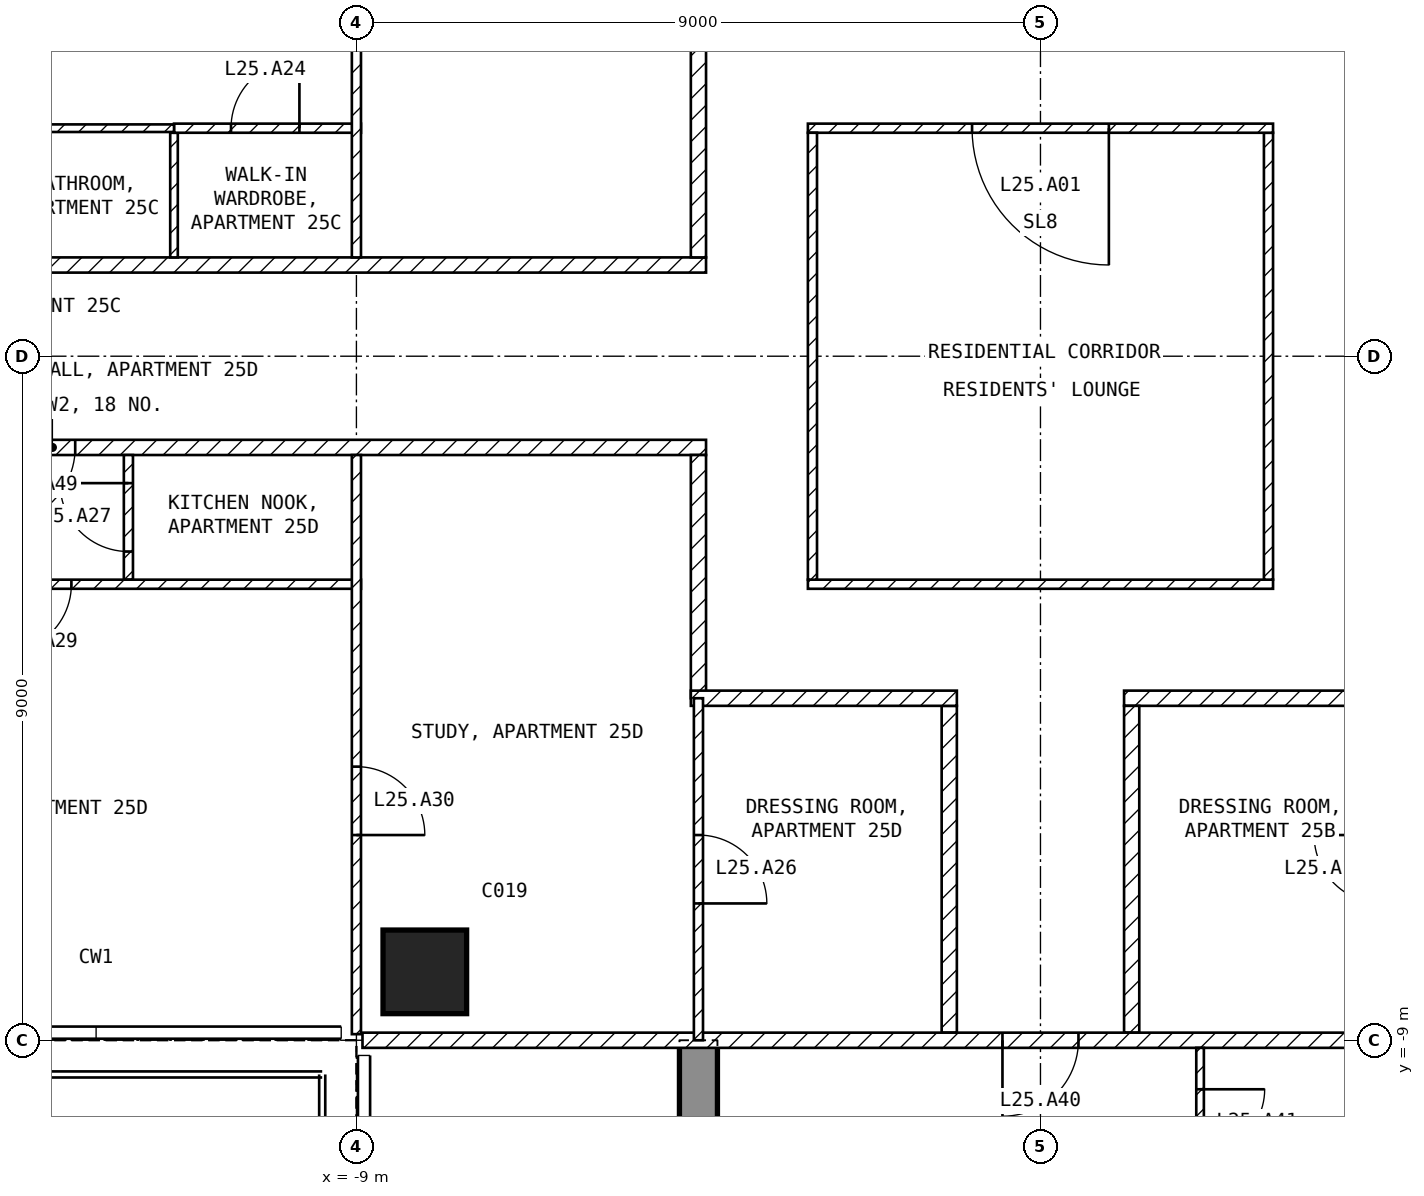
"""IFC4 building model, lengths in metres.
Left out: names, types, materials, properties, quantities, classifications, styles, units other than length and angle.
Written with IfcOpenShell. Run it as: python <this file> out.ifc"""

import sys

from ifc_helpers import new_model, si_unit, direction, frame, frame_2d, origin, origin_2d, place, context, subcontext, project, spatial, polyline, rectangle, outline, extrude, element, fill, save


model = new_model("IFC4")
c1 = context("Model", 3, precision=1e-05, world=origin(), true_north=direction((0.0, 1.0)))
c2 = subcontext(c1, "Body", "Model", "MODEL_VIEW")
j1 = project(units=[si_unit("LENGTHUNIT", "METRE"), si_unit("PLANEANGLEUNIT", "RADIAN")], contexts=[c1])
p1 = place(None, origin())
s1 = spatial("IfcSite", under=j1, at=p1, CompositionType="ELEMENT")
p2 = place(p1, origin())
s2 = spatial("IfcBuilding", under=s1, at=p2, CompositionType="ELEMENT")
p3 = place(p2, frame((0.0, 0.0, 109.4)))
s3 = spatial("IfcBuildingStorey", under=s2, at=p3, CompositionType="ELEMENT", Elevation=109.4)
p4 = place(p3, frame((-8.1, -8.1, -0.25), z_axis=(0.0, 0.0, 1.0), x_axis=(1.0, 0.0, 0.0)))
e1 = element("IfcColumn", 1, at=p4, inside=s3, PredefinedType="COLUMN", context=c2, shape_type="SweptSolid", body=[
    extrude(rectangle(XDim=1.1, YDim=1.1, at=origin_2d()), origin(), (0.0, 0.0, 1.0), 3.5),
])
p5 = place(p3, frame((-4.75, -20.15, -0.25), z_axis=(1.0, 0.0, 0.0), x_axis=(0.0, 1.0, 0.0)))
e2 = element("IfcWall", 2, at=p5, inside=s3, PredefinedType="SHEAR", context=c2, shape_type="SweptSolid", body=[
    extrude(outline(polyline([(0.0, 0.0), (6.65, 0.0), (6.65, 2.65), (9.05, 2.65), (9.05, 0.0), (11.15, 0.0), (11.15, 3.5), (0.0, 3.5), (0.0, 0.0)])), origin(), (0.0, 0.0, 1.0), 0.5),
])
p6 = place(p3, frame((-3.06, -3.0, 0.0), z_axis=(0.0, 0.0, 1.0), x_axis=(1.0, 0.0, 0.0)))
e3 = element("IfcWall", 3, at=p6, inside=s3, PredefinedType="PARTITIONING", context=c2, shape_type="SweptSolid", body=[
    extrude(rectangle(XDim=6.12, YDim=0.12, at=frame_2d((3.06, 0.0))), origin(), (0.0, 0.0, 1.0), 3.25),
])
p7 = place(p3, frame((3.0, -2.94, 0.0), z_axis=(0.0, 0.0, 1.0), x_axis=(0.0, 1.0, 0.0)))
e4 = element("IfcWall", 4, at=p7, inside=s3, PredefinedType="PARTITIONING", context=c2, shape_type="SweptSolid", body=[
    extrude(rectangle(XDim=5.88, YDim=0.12, at=frame_2d((2.94, 0.0))), origin(), (0.0, 0.0, 1.0), 3.25),
])
p8 = place(p3, frame((3.06, 3.0, 0.0), z_axis=(0.0, 0.0, 1.0), x_axis=(-1.0, 0.0, 0.0)))
e5 = element("IfcWall", 5, at=p8, inside=s3, PredefinedType="PARTITIONING", context=c2, shape_type="SweptSolid", body=[
    extrude(rectangle(XDim=6.12, YDim=0.12, at=frame_2d((3.06, 0.0))), origin(), (0.0, 0.0, 1.0), 3.25),
])
p9 = place(p8, frame((2.16, 0.0, 0.0)))
e6 = element("IfcOpeningElement", 6, at=p9, cuts=e5, PredefinedType="OPENING", context=c2, shape_type="SweptSolid", body=[
    extrude(rectangle(XDim=1.8, YDim=2.1, at=frame_2d((0.9, 1.05))), frame((0.0, 0.07, 0.0), z_axis=(0.0, -1.0, 0.0), x_axis=(1.0, 0.0, 0.0)), (0.0, 0.0, 1.0), 0.14),
])
p10 = place(p3, frame((-3.0, 2.94, 0.0), z_axis=(0.0, 0.0, 1.0), x_axis=(0.0, -1.0, 0.0)))
e7 = element("IfcWall", 7, at=p10, inside=s3, PredefinedType="PARTITIONING", context=c2, shape_type="SweptSolid", body=[
    extrude(rectangle(XDim=5.88, YDim=0.12, at=frame_2d((2.94, 0.0))), origin(), (0.0, 0.0, 1.0), 3.25),
])
p11 = place(p3, frame((4.6, -4.5, 0.0), z_axis=(0.0, 0.0, 1.0), x_axis=(-1.0, 0.0, 0.0)))
e8 = element("IfcWall", 8, at=p11, inside=s3, PredefinedType="PARTITIONING", context=c2, shape_type="SweptSolid", body=[
    extrude(rectangle(XDim=3.5, YDim=0.2, at=frame_2d((1.75, 0.0))), origin(), (0.0, 0.0, 1.0), 3.25),
])
p12 = place(p3, frame((1.2, -4.6, 0.0), z_axis=(0.0, 0.0, 1.0), x_axis=(0.0, -1.0, 0.0)))
e9 = element("IfcWall", 9, at=p12, inside=s3, PredefinedType="PARTITIONING", context=c2, shape_type="SweptSolid", body=[
    extrude(rectangle(XDim=4.3, YDim=0.2, at=frame_2d((2.15, 0.0))), origin(), (0.0, 0.0, 1.0), 3.25),
])
p13 = place(p3, frame((-21.6, 1.2, 0.0), z_axis=(0.0, 0.0, 1.0), x_axis=(1.0, 0.0, 0.0)))
e10 = element("IfcWall", 10, at=p13, inside=s3, PredefinedType="PARTITIONING", context=c2, shape_type="SweptSolid", body=[
    extrude(rectangle(XDim=17.2, YDim=0.2, at=frame_2d((8.6, 0.0))), origin(), (0.0, 0.0, 1.0), 3.25),
])
p14 = place(p13, frame((6.1, 0.0, 0.0)))
e11 = element("IfcOpeningElement", 11, at=p14, cuts=e10, PredefinedType="OPENING", context=c2, shape_type="SweptSolid", body=[
    extrude(rectangle(XDim=1.0, YDim=2.1, at=frame_2d((0.5, 1.05))), frame((0.0, 0.11, 0.0), z_axis=(0.0, -1.0, 0.0), x_axis=(1.0, 0.0, 0.0)), (0.0, 0.0, 1.0), 0.22),
])
p15 = place(p3, frame((-4.5, 1.3, 0.0), z_axis=(0.0, 0.0, 1.0), x_axis=(0.0, 1.0, 0.0)))
e12 = element("IfcWall", 12, at=p15, inside=s3, PredefinedType="PARTITIONING", context=c2, shape_type="SweptSolid", body=[
    extrude(rectangle(XDim=3.2, YDim=0.2, at=frame_2d((1.6, 0.0))), origin(), (0.0, 0.0, 1.0), 3.25),
])
p16 = place(p3, frame((-4.4, -1.2, 0.0), z_axis=(0.0, 0.0, 1.0), x_axis=(-1.0, 0.0, 0.0)))
e13 = element("IfcWall", 13, at=p16, inside=s3, PredefinedType="PARTITIONING", context=c2, shape_type="SweptSolid", body=[
    extrude(rectangle(XDim=17.2, YDim=0.2, at=frame_2d((8.6, 0.0))), origin(), (0.0, 0.0, 1.0), 3.25),
])
p17 = place(p16, frame((8.3, 0.0, 0.0)))
e14 = element("IfcOpeningElement", 14, at=p17, cuts=e13, PredefinedType="OPENING", context=c2, shape_type="SweptSolid", body=[
    extrude(rectangle(XDim=1.0, YDim=2.1, at=frame_2d((0.5, 1.05))), frame((0.0, 0.11, 0.0), z_axis=(0.0, -1.0, 0.0), x_axis=(1.0, 0.0, 0.0)), (0.0, 0.0, 1.0), 0.22),
])
p18 = place(p3, frame((-4.5, -4.5, 0.0), z_axis=(0.0, 0.0, 1.0), x_axis=(0.0, 1.0, 0.0)))
e15 = element("IfcWall", 15, at=p18, inside=s3, PredefinedType="PARTITIONING", context=c2, shape_type="SweptSolid", body=[
    extrude(rectangle(XDim=3.2, YDim=0.2, at=frame_2d((1.6, 0.0))), origin(), (0.0, 0.0, 1.0), 3.25),
])
p19 = place(p3, frame((-1.2, -8.9, 0.0), z_axis=(0.0, 0.0, 1.0), x_axis=(0.0, 1.0, 0.0)))
e16 = element("IfcWall", 16, at=p19, inside=s3, PredefinedType="PARTITIONING", context=c2, shape_type="SweptSolid", body=[
    extrude(rectangle(XDim=4.3, YDim=0.2, at=frame_2d((2.15, 0.0))), origin(), (0.0, 0.0, 1.0), 3.25),
])
p20 = place(p3, frame((-1.1, -4.5, 0.0), z_axis=(0.0, 0.0, 1.0), x_axis=(-1.0, 0.0, 0.0)))
e17 = element("IfcWall", 17, at=p20, inside=s3, PredefinedType="PARTITIONING", context=c2, shape_type="SweptSolid", body=[
    extrude(rectangle(XDim=3.5, YDim=0.2, at=frame_2d((1.75, 0.0))), origin(), (0.0, 0.0, 1.0), 3.25),
])
p21 = place(p3, frame((8.92, -9.0, 0.0), z_axis=(0.0, 0.0, 1.0), x_axis=(-1.0, 0.0, 0.0)))
e18 = element("IfcWall", 18, at=p21, inside=s3, PredefinedType="PARTITIONING", context=c2, shape_type="SweptSolid", body=[
    extrude(rectangle(XDim=17.84, YDim=0.2, at=frame_2d((8.92, 0.0))), origin(), (0.0, 0.0, 1.0), 3.25),
])
p22 = place(p21, frame((8.42, 0.0, 0.0)))
e19 = element("IfcOpeningElement", 19, at=p22, cuts=e18, PredefinedType="OPENING", context=c2, shape_type="SweptSolid", body=[
    extrude(rectangle(XDim=1.0, YDim=2.1, at=frame_2d((0.5, 1.05))), frame((0.0, 0.11, 0.0), z_axis=(0.0, -1.0, 0.0), x_axis=(1.0, 0.0, 0.0)), (0.0, 0.0, 1.0), 0.22),
])
p23 = place(p3, frame((-11.4, 1.3, 0.0), z_axis=(0.0, 0.0, 1.0), x_axis=(0.0, 1.0, 0.0)))
e20 = element("IfcWall", 20, at=p23, inside=s3, PredefinedType="PARTITIONING", context=c2, shape_type="SweptSolid", body=[
    extrude(rectangle(XDim=1.64, YDim=0.1, at=frame_2d((0.82, 0.0))), origin(), (0.0, 0.0, 1.0), 3.25),
])
p24 = place(p3, frame((-11.4, 3.0, 0.0), z_axis=(0.0, 0.0, 1.0), x_axis=(1.0, 0.0, 0.0)))
e21 = element("IfcWall", 21, at=p24, inside=s3, PredefinedType="PARTITIONING", context=c2, shape_type="SweptSolid", body=[
    extrude(rectangle(XDim=2.46, YDim=0.12, at=frame_2d((1.23, 0.0))), origin(), (0.0, 0.0, 1.0), 3.25),
])
p25 = place(p24, frame((0.75, 0.0, 0.0)))
e22 = element("IfcOpeningElement", 22, at=p25, cuts=e21, PredefinedType="OPENING", context=c2, shape_type="SweptSolid", body=[
    extrude(rectangle(XDim=0.9, YDim=2.1, at=frame_2d((0.45, 1.05))), frame((0.0, 0.07, 0.0), z_axis=(0.0, -1.0, 0.0), x_axis=(1.0, 0.0, 0.0)), (0.0, 0.0, 1.0), 0.14),
])
p26 = place(p3, frame((-9.0, 8.92, 0.0), z_axis=(0.0, 0.0, 1.0), x_axis=(0.0, -1.0, 0.0)))
e23 = element("IfcWall", 23, at=p26, inside=s3, PredefinedType="PARTITIONING", context=c2, shape_type="SweptSolid", body=[
    extrude(rectangle(XDim=7.62, YDim=0.12, at=frame_2d((3.81, 0.0))), origin(), (0.0, 0.0, 1.0), 3.25),
])
p27 = place(p26, frame((2.62, 0.0, 0.0)))
e24 = element("IfcOpeningElement", 24, at=p27, cuts=e23, PredefinedType="OPENING", context=c2, shape_type="SweptSolid", body=[
    extrude(rectangle(XDim=0.9, YDim=2.1, at=frame_2d((0.45, 1.05))), frame((0.0, 0.07, 0.0), z_axis=(0.0, -1.0, 0.0), x_axis=(1.0, 0.0, 0.0)), (0.0, 0.0, 1.0), 0.14),
])
p28 = place(p3, frame((-13.8, 3.0, 0.0), z_axis=(0.0, 0.0, 1.0), x_axis=(1.0, 0.0, 0.0)))
e25 = element("IfcWall", 25, at=p28, inside=s3, PredefinedType="PARTITIONING", context=c2, shape_type="SweptSolid", body=[
    extrude(rectangle(XDim=2.4, YDim=0.1, at=frame_2d((1.2, 0.0))), origin(), (0.0, 0.0, 1.0), 3.25),
])
p29 = place(p3, frame((-12.0, -2.94, 0.0), z_axis=(0.0, 0.0, 1.0), x_axis=(0.0, 1.0, 0.0)))
e26 = element("IfcWall", 26, at=p29, inside=s3, PredefinedType="PARTITIONING", context=c2, shape_type="SweptSolid", body=[
    extrude(rectangle(XDim=1.64, YDim=0.12, at=frame_2d((0.82, 0.0))), origin(), (0.0, 0.0, 1.0), 3.25),
])
p30 = place(p29, frame((0.37, 0.0, 0.0)))
e27 = element("IfcOpeningElement", 27, at=p30, cuts=e26, PredefinedType="OPENING", context=c2, shape_type="SweptSolid", body=[
    extrude(rectangle(XDim=0.9, YDim=2.1, at=frame_2d((0.45, 1.05))), frame((0.0, 0.07, 0.0), z_axis=(0.0, -1.0, 0.0), x_axis=(1.0, 0.0, 0.0)), (0.0, 0.0, 1.0), 0.14),
])
p31 = place(p3, frame((-8.94, -3.0, 0.0), z_axis=(0.0, 0.0, 1.0), x_axis=(-1.0, 0.0, 0.0)))
e28 = element("IfcWall", 28, at=p31, inside=s3, PredefinedType="PARTITIONING", context=c2, shape_type="SweptSolid", body=[
    extrude(rectangle(XDim=7.86, YDim=0.12, at=frame_2d((3.93, 0.0))), origin(), (0.0, 0.0, 1.0), 3.25),
])
p32 = place(p31, frame((3.81, 0.0, 0.0)))
e29 = element("IfcOpeningElement", 29, at=p32, cuts=e28, PredefinedType="OPENING", context=c2, shape_type="SweptSolid", body=[
    extrude(rectangle(XDim=0.9, YDim=2.1, at=frame_2d((0.45, 1.05))), frame((0.0, 0.07, 0.0), z_axis=(0.0, -1.0, 0.0), x_axis=(1.0, 0.0, 0.0)), (0.0, 0.0, 1.0), 0.14),
])
p33 = place(p3, frame((-9.0, -1.3, 0.0), z_axis=(0.0, 0.0, 1.0), x_axis=(0.0, -1.0, 0.0)))
e30 = element("IfcWall", 30, at=p33, inside=s3, PredefinedType="PARTITIONING", context=c2, shape_type="SweptSolid", body=[
    extrude(rectangle(XDim=7.62, YDim=0.12, at=frame_2d((3.81, 0.0))), origin(), (0.0, 0.0, 1.0), 3.25),
])
p34 = place(p33, frame((4.1, 0.0, 0.0)))
e31 = element("IfcOpeningElement", 31, at=p34, cuts=e30, PredefinedType="OPENING", context=c2, shape_type="SweptSolid", body=[
    extrude(rectangle(XDim=0.9, YDim=2.1, at=frame_2d((0.45, 1.05))), frame((0.0, 0.07, 0.0), z_axis=(0.0, -1.0, 0.0), x_axis=(1.0, 0.0, 0.0)), (0.0, 0.0, 1.0), 0.14),
])
p35 = place(p3, frame((-4.5, -4.5, 0.0), z_axis=(0.0, 0.0, 1.0), x_axis=(0.0, -1.0, 0.0)))
e32 = element("IfcWall", 32, at=p35, inside=s3, PredefinedType="PARTITIONING", context=c2, shape_type="SweptSolid", body=[
    extrude(rectangle(XDim=4.5, YDim=0.12, at=frame_2d((2.25, 0.0))), origin(), (0.0, 0.0, 1.0), 3.25),
])
p36 = place(p35, frame((1.8, 0.0, 0.0)))
e33 = element("IfcOpeningElement", 33, at=p36, cuts=e32, PredefinedType="OPENING", context=c2, shape_type="SweptSolid", body=[
    extrude(rectangle(XDim=0.9, YDim=2.1, at=frame_2d((0.45, 1.05))), frame((0.0, 0.07, 0.0), z_axis=(0.0, -1.0, 0.0), x_axis=(1.0, 0.0, 0.0)), (0.0, 0.0, 1.0), 0.14),
])
p37 = place(p3, frame((2.1, -9.1, 0.0), z_axis=(0.0, 0.0, 1.0), x_axis=(0.0, -1.0, 0.0)))
e34 = element("IfcWall", 34, at=p37, inside=s3, PredefinedType="PARTITIONING", context=c2, shape_type="SweptSolid", body=[
    extrude(rectangle(XDim=1.94, YDim=0.1, at=frame_2d((0.97, 0.0))), origin(), (0.0, 0.0, 1.0), 3.25),
])
p38 = place(p37, frame((0.545, 0.0, 0.0)))
e35 = element("IfcOpeningElement", 35, at=p38, cuts=e34, PredefinedType="OPENING", context=c2, shape_type="SweptSolid", body=[
    extrude(rectangle(XDim=0.85, YDim=2.1, at=frame_2d((0.425, 1.05))), frame((0.0, 0.06, 0.0), z_axis=(0.0, -1.0, 0.0), x_axis=(1.0, 0.0, 0.0)), (0.0, 0.0, 1.0), 0.12),
])
p39 = place(p9, origin())
e36 = element("IfcDoor", 36, at=p39, inside=s3, OperationType="SINGLE_SWING_LEFT", PredefinedType="DOOR", context=c2, shape_type="SweptSolid", body=[
    extrude(rectangle(XDim=1.8, YDim=2.1, at=frame_2d((0.9, 1.05))), frame((0.0, 0.025, 0.0), z_axis=(0.0, -1.0, 0.0), x_axis=(1.0, 0.0, 0.0)), (0.0, 0.0, 1.0), 0.05),
])
fill(e6, e36)
p40 = place(p25, origin())
e37 = element("IfcDoor", 37, at=p40, inside=s3, OperationType="SINGLE_SWING_RIGHT", PredefinedType="DOOR", context=c2, shape_type="SweptSolid", body=[
    extrude(rectangle(XDim=0.9, YDim=2.1, at=frame_2d((0.45, 1.05))), frame((0.0, 0.025, 0.0), z_axis=(0.0, -1.0, 0.0), x_axis=(1.0, 0.0, 0.0)), (0.0, 0.0, 1.0), 0.05),
])
fill(e22, e37)
p41 = place(p36, origin())
e38 = element("IfcDoor", 38, at=p41, inside=s3, OperationType="SINGLE_SWING_RIGHT", PredefinedType="DOOR", context=c2, shape_type="SweptSolid", body=[
    extrude(rectangle(XDim=0.9, YDim=2.1, at=frame_2d((0.45, 1.05))), frame((0.0, 0.025, 0.0), z_axis=(0.0, -1.0, 0.0), x_axis=(1.0, 0.0, 0.0)), (0.0, 0.0, 1.0), 0.05),
])
fill(e33, e38)
p42 = place(p30, origin())
e39 = element("IfcDoor", 39, at=p42, inside=s3, OperationType="SINGLE_SWING_RIGHT", PredefinedType="DOOR", context=c2, shape_type="SweptSolid", body=[
    extrude(rectangle(XDim=0.9, YDim=2.1, at=frame_2d((0.45, 1.05))), frame((0.0, 0.025, 0.0), z_axis=(0.0, -1.0, 0.0), x_axis=(1.0, 0.0, 0.0)), (0.0, 0.0, 1.0), 0.05),
])
fill(e27, e39)
p43 = place(p32, origin())
e40 = element("IfcDoor", 40, at=p43, inside=s3, OperationType="SINGLE_SWING_RIGHT", PredefinedType="DOOR", context=c2, shape_type="SweptSolid", body=[
    extrude(rectangle(XDim=0.9, YDim=2.1, at=frame_2d((0.45, 1.05))), frame((0.0, 0.025, 0.0), z_axis=(0.0, -1.0, 0.0), x_axis=(1.0, 0.0, 0.0)), (0.0, 0.0, 1.0), 0.05),
])
fill(e29, e40)
p44 = place(p34, origin())
e41 = element("IfcDoor", 41, at=p44, inside=s3, OperationType="SINGLE_SWING_RIGHT", PredefinedType="DOOR", context=c2, shape_type="SweptSolid", body=[
    extrude(rectangle(XDim=0.9, YDim=2.1, at=frame_2d((0.45, 1.05))), frame((0.0, 0.025, 0.0), z_axis=(0.0, -1.0, 0.0), x_axis=(1.0, 0.0, 0.0)), (0.0, 0.0, 1.0), 0.05),
])
fill(e31, e41)
p45 = place(p22, origin())
e42 = element("IfcDoor", 42, at=p45, inside=s3, OperationType="SINGLE_SWING_RIGHT", PredefinedType="DOOR", context=c2, shape_type="SweptSolid", body=[
    extrude(rectangle(XDim=1.0, YDim=2.1, at=frame_2d((0.5, 1.05))), frame((0.0, 0.025, 0.0), z_axis=(0.0, -1.0, 0.0), x_axis=(1.0, 0.0, 0.0)), (0.0, 0.0, 1.0), 0.05),
])
fill(e19, e42)
p46 = place(p38, origin())
e43 = element("IfcDoor", 43, at=p46, inside=s3, OperationType="SINGLE_SWING_LEFT", PredefinedType="DOOR", context=c2, shape_type="SweptSolid", body=[
    extrude(rectangle(XDim=0.85, YDim=2.1, at=frame_2d((0.425, 1.05))), frame((0.0, 0.025, 0.0), z_axis=(0.0, -1.0, 0.0), x_axis=(1.0, 0.0, 0.0)), (0.0, 0.0, 1.0), 0.05),
])
fill(e35, e43)
p47 = place(p17, origin())
e44 = element("IfcDoor", 44, at=p47, inside=s3, OperationType="SINGLE_SWING_RIGHT", PredefinedType="DOOR", context=c2, shape_type="SweptSolid", body=[
    extrude(rectangle(XDim=1.0, YDim=2.1, at=frame_2d((0.5, 1.05))), frame((0.0, 0.025, 0.0), z_axis=(0.0, -1.0, 0.0), x_axis=(1.0, 0.0, 0.0)), (0.0, 0.0, 1.0), 0.05),
])
fill(e14, e44)
save(model, sys.argv[1])
